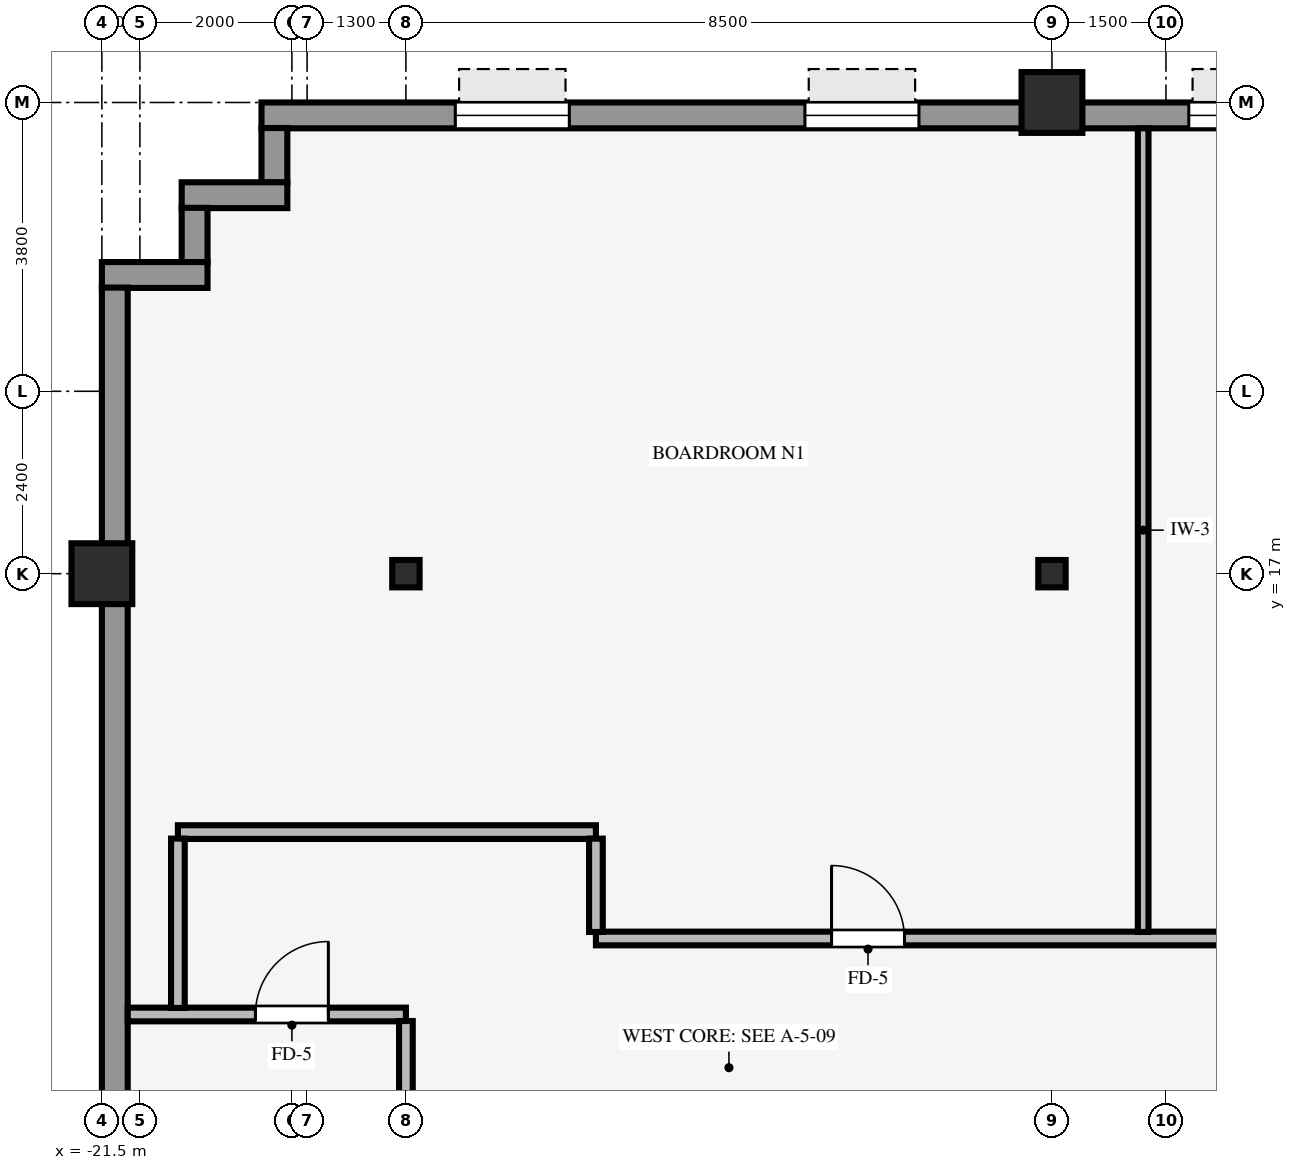
"""IFC4 building model, lengths in metres.
Left out: names, types, materials, properties, quantities, classifications, styles, units other than length and angle.
Written with IfcOpenShell. Run it as: python <this file> out.ifc"""

import sys

from ifc_helpers import new_model, si_unit, direction, frame, frame_2d, origin, origin_2d, place, context, subcontext, project, spatial, rectangle, hollow_rectangle, i_section, extrude, source, transform, mapped, element, fill, save


model = new_model("IFC4")
c1 = context("Model", 3, precision=1e-05, world=origin(), true_north=direction((0.0, 1.0)))
c2 = subcontext(c1, "Body", "Model", "MODEL_VIEW")
j1 = project(units=[si_unit("LENGTHUNIT", "METRE"), si_unit("PLANEANGLEUNIT", "RADIAN")], contexts=[c1])
p1 = place(None, origin())
s1 = spatial("IfcSite", under=j1, at=p1, CompositionType="ELEMENT")
p2 = place(p1, origin())
s2 = spatial("IfcBuilding", under=s1, at=p2, CompositionType="ELEMENT")
p3 = place(p2, frame((0.0, 0.0, 78.7)))
s3 = spatial("IfcBuildingStorey", under=s2, at=p3, CompositionType="ELEMENT", Elevation=78.7)
for number, where, z_axis, x_axis in (
    (1, (-21.5, 17.0, 0.0), (0.0, 0.0, 1.0), (1.0, 0.0, 0.0)),
    (2, (-9.0, 23.2, 0.0), (0.0, 0.0, 1.0), (1.0, 0.0, 0.0)),
):
    element("IfcColumn", number, at=place(p3, frame(where, z_axis=z_axis, x_axis=x_axis)), inside=s3, PredefinedType="COLUMN", context=c2, shape_type="SweptSolid", body=[
        extrude(hollow_rectangle(XDim=0.8, YDim=0.8, WallThickness=0.055, InnerFilletRadius=0.055, OuterFilletRadius=0.11, at=origin_2d()), origin(), (0.0, 0.0, 1.0), 3.37),
    ])
for number, where, z_axis, x_axis in (
    (3, (-17.5, 17.0, 0.0), (0.0, 0.0, 1.0), (1.0, 0.0, 0.0)),
    (4, (-9.0, 17.0, 0.0), (0.0, 0.0, 1.0), (1.0, 0.0, 0.0)),
):
    element("IfcColumn", number, at=place(p3, frame(where, z_axis=z_axis, x_axis=x_axis)), inside=s3, PredefinedType="COLUMN", context=c2, shape_type="SweptSolid", body=[
        extrude(i_section(OverallWidth=0.36, OverallDepth=0.36, WebThickness=0.021, FlangeThickness=0.021, FilletRadius=0.018, at=origin_2d()), origin(), (0.0, 0.0, 1.0), 3.37),
    ])
p4 = place(p3, frame((-19.4, 23.03, 0.0), z_axis=(0.0, 0.0, 1.0), x_axis=(1.0, 0.0, 0.0)))
e5 = element("IfcWall", 5, at=p4, inside=s3, PredefinedType="STANDARD", context=c2, shape_type="SweptSolid", body=[
    extrude(rectangle(XDim=38.8, YDim=0.34, at=frame_2d((19.4, 0.0))), origin(), (0.0, 0.0, 1.0), 2.705),
])
p5 = place(p4, frame((2.55, 0.0, 0.8)))
e6 = element("IfcOpeningElement", 6, at=p5, cuts=e5, PredefinedType="OPENING", context=c2, shape_type="SweptSolid", body=[
    extrude(rectangle(XDim=1.5, YDim=1.6, at=frame_2d((0.75, 0.8))), frame((0.0, 0.18, 0.0), z_axis=(0.0, -1.0, 0.0), x_axis=(1.0, 0.0, 0.0)), (0.0, 0.0, 1.0), 0.36),
])
p6 = place(p4, frame((7.15, 0.0, 0.8)))
e7 = element("IfcOpeningElement", 7, at=p6, cuts=e5, PredefinedType="OPENING", context=c2, shape_type="SweptSolid", body=[
    extrude(rectangle(XDim=1.5, YDim=1.6, at=frame_2d((0.75, 0.8))), frame((0.0, 0.18, 0.0), z_axis=(0.0, -1.0, 0.0), x_axis=(1.0, 0.0, 0.0)), (0.0, 0.0, 1.0), 0.36),
])
p7 = place(p4, frame((12.2, 0.0, 0.8)))
e8 = element("IfcOpeningElement", 8, at=p7, cuts=e5, PredefinedType="OPENING", context=c2, shape_type="SweptSolid", body=[
    extrude(rectangle(XDim=1.5, YDim=1.6, at=frame_2d((0.75, 0.8))), frame((0.0, 0.18, 0.0), z_axis=(0.0, -1.0, 0.0), x_axis=(1.0, 0.0, 0.0)), (0.0, 0.0, 1.0), 0.36),
])
p8 = place(p4, frame((16.35, 0.0, 0.8)))
e9 = element("IfcOpeningElement", 9, at=p8, cuts=e5, PredefinedType="OPENING", context=c2, shape_type="SweptSolid", body=[
    extrude(rectangle(XDim=1.5, YDim=1.6, at=frame_2d((0.75, 0.8))), frame((0.0, 0.18, 0.0), z_axis=(0.0, -1.0, 0.0), x_axis=(1.0, 0.0, 0.0)), (0.0, 0.0, 1.0), 0.36),
])
p9 = place(p4, frame((20.95, 0.0, 0.8)))
e10 = element("IfcOpeningElement", 10, at=p9, cuts=e5, PredefinedType="OPENING", context=c2, shape_type="SweptSolid", body=[
    extrude(rectangle(XDim=1.5, YDim=1.6, at=frame_2d((0.75, 0.8))), frame((0.0, 0.18, 0.0), z_axis=(0.0, -1.0, 0.0), x_axis=(1.0, 0.0, 0.0)), (0.0, 0.0, 1.0), 0.36),
])
p10 = place(p4, frame((25.55, 0.0, 0.8)))
e11 = element("IfcOpeningElement", 11, at=p10, cuts=e5, PredefinedType="OPENING", context=c2, shape_type="SweptSolid", body=[
    extrude(rectangle(XDim=1.5, YDim=1.6, at=frame_2d((0.75, 0.8))), frame((0.0, 0.18, 0.0), z_axis=(0.0, -1.0, 0.0), x_axis=(1.0, 0.0, 0.0)), (0.0, 0.0, 1.0), 0.36),
])
p11 = place(p4, frame((30.15, 0.0, 0.8)))
e12 = element("IfcOpeningElement", 12, at=p11, cuts=e5, PredefinedType="OPENING", context=c2, shape_type="SweptSolid", body=[
    extrude(rectangle(XDim=1.5, YDim=1.6, at=frame_2d((0.75, 0.8))), frame((0.0, 0.18, 0.0), z_axis=(0.0, -1.0, 0.0), x_axis=(1.0, 0.0, 0.0)), (0.0, 0.0, 1.0), 0.36),
])
p12 = place(p4, frame((34.75, 0.0, 0.8)))
e13 = element("IfcOpeningElement", 13, at=p12, cuts=e5, PredefinedType="OPENING", context=c2, shape_type="SweptSolid", body=[
    extrude(rectangle(XDim=1.5, YDim=1.6, at=frame_2d((0.75, 0.8))), frame((0.0, 0.18, 0.0), z_axis=(0.0, -1.0, 0.0), x_axis=(1.0, 0.0, 0.0)), (0.0, 0.0, 1.0), 0.36),
])
p13 = place(p3, frame((-19.23, 22.146, 0.0), z_axis=(0.0, 0.0, 1.0), x_axis=(0.0, 1.0, 0.0)))
e14 = element("IfcWall", 14, at=p13, inside=s3, PredefinedType="STANDARD", context=c2, shape_type="SweptSolid", body=[
    extrude(rectangle(XDim=0.718, YDim=0.34, at=frame_2d((0.359, 0.0))), origin(), (0.0, 0.0, 1.0), 3.36),
])
p14 = place(p3, frame((-20.45, 21.98, 0.0), z_axis=(0.0, 0.0, 1.0), x_axis=(1.0, 0.0, 0.0)))
e15 = element("IfcWall", 15, at=p14, inside=s3, PredefinedType="STANDARD", context=c2, shape_type="SweptSolid", body=[
    extrude(rectangle(XDim=1.39, YDim=0.34, at=frame_2d((0.695, 0.0))), origin(), (0.0, 0.0, 1.0), 3.36),
])
p15 = place(p3, frame((-20.28, 21.096, 0.0), z_axis=(0.0, 0.0, 1.0), x_axis=(0.0, 1.0, 0.0)))
e16 = element("IfcWall", 16, at=p15, inside=s3, PredefinedType="STANDARD", context=c2, shape_type="SweptSolid", body=[
    extrude(rectangle(XDim=0.718, YDim=0.34, at=frame_2d((0.359, 0.0))), origin(), (0.0, 0.0, 1.0), 3.36),
])
p16 = place(p3, frame((-21.5, 20.93, 0.0), z_axis=(0.0, 0.0, 1.0), x_axis=(1.0, 0.0, 0.0)))
e17 = element("IfcWall", 17, at=p16, inside=s3, PredefinedType="STANDARD", context=c2, shape_type="SweptSolid", body=[
    extrude(rectangle(XDim=1.39, YDim=0.34, at=frame_2d((0.695, 0.0))), origin(), (0.0, 0.0, 1.0), 3.36),
])
p17 = place(p3, frame((-21.33, -20.764, 0.0), z_axis=(0.0, 0.0, 1.0), x_axis=(0.0, 1.0, 0.0)))
e18 = element("IfcWall", 18, at=p17, inside=s3, PredefinedType="STANDARD", context=c2, shape_type="SweptSolid", body=[
    extrude(rectangle(XDim=41.528, YDim=0.34, at=frame_2d((20.764, 0.0))), origin(), (0.0, 0.0, 1.0), 2.705),
])
p18 = place(p17, frame((15.364, 0.0, 0.0)))
e19 = element("IfcOpeningElement", 19, at=p18, cuts=e18, PredefinedType="OPENING", context=c2, shape_type="SweptSolid", body=[
    extrude(rectangle(XDim=1.05, YDim=2.1, at=frame_2d((0.525, 1.05))), frame((0.0, 0.18, 0.0), z_axis=(0.0, -1.0, 0.0), x_axis=(1.0, 0.0, 0.0)), (0.0, 0.0, 1.0), 0.36),
])
p19 = place(p17, frame((12.202, 0.0, 0.8)))
e20 = element("IfcOpeningElement", 20, at=p19, cuts=e18, PredefinedType="OPENING", context=c2, shape_type="SweptSolid", body=[
    extrude(rectangle(XDim=2.3, YDim=1.62, at=frame_2d((1.15, 0.81))), frame((0.0, 0.18, 0.0), z_axis=(0.0, -1.0, 0.0), x_axis=(1.0, 0.0, 0.0)), (0.0, 0.0, 1.0), 0.36),
])
p20 = place(p17, frame((17.144, 0.0, 0.8)))
e21 = element("IfcOpeningElement", 21, at=p20, cuts=e18, PredefinedType="OPENING", context=c2, shape_type="SweptSolid", body=[
    extrude(rectangle(XDim=2.3, YDim=1.62, at=frame_2d((1.15, 0.81))), frame((0.0, 0.18, 0.0), z_axis=(0.0, -1.0, 0.0), x_axis=(1.0, 0.0, 0.0)), (0.0, 0.0, 1.0), 0.36),
])
p21 = place(p17, frame((22.084, 0.0, 0.8)))
e22 = element("IfcOpeningElement", 22, at=p21, cuts=e18, PredefinedType="OPENING", context=c2, shape_type="SweptSolid", body=[
    extrude(rectangle(XDim=2.3, YDim=1.62, at=frame_2d((1.15, 0.81))), frame((0.0, 0.18, 0.0), z_axis=(0.0, -1.0, 0.0), x_axis=(1.0, 0.0, 0.0)), (0.0, 0.0, 1.0), 0.36),
])
p22 = place(p17, frame((27.025, 0.0, 0.8)))
e23 = element("IfcOpeningElement", 23, at=p22, cuts=e18, PredefinedType="OPENING", context=c2, shape_type="SweptSolid", body=[
    extrude(rectangle(XDim=2.3, YDim=1.62, at=frame_2d((1.15, 0.81))), frame((0.0, 0.18, 0.0), z_axis=(0.0, -1.0, 0.0), x_axis=(1.0, 0.0, 0.0)), (0.0, 0.0, 1.0), 0.36),
])
p23 = place(p3, frame((-21.16, 11.2, 0.0), z_axis=(0.0, 0.0, 1.0), x_axis=(1.0, 0.0, 0.0)))
e24 = element("IfcWall", 24, at=p23, inside=s3, PredefinedType="PARTITIONING", context=c2, shape_type="SweptSolid", body=[
    extrude(rectangle(XDim=3.66, YDim=0.18, at=frame_2d((1.83, 0.0))), origin(), (0.0, 0.0, 1.0), 3.36),
])
p24 = place(p23, frame((1.68, 0.0, 0.0)))
e25 = element("IfcOpeningElement", 25, at=p24, cuts=e24, PredefinedType="OPENING", context=c2, shape_type="SweptSolid", body=[
    extrude(rectangle(XDim=0.96, YDim=2.1, at=frame_2d((0.48, 1.05))), frame((0.0, 0.1, 0.0), z_axis=(0.0, -1.0, 0.0), x_axis=(1.0, 0.0, 0.0)), (0.0, 0.0, 1.0), 0.2),
])
p25 = place(p3, frame((-15.0, 12.2, 0.0), z_axis=(0.0, 0.0, 1.0), x_axis=(1.0, 0.0, 0.0)))
e26 = element("IfcWall", 26, at=p25, inside=s3, PredefinedType="PARTITIONING", context=c2, shape_type="SweptSolid", body=[
    extrude(rectangle(XDim=30.0, YDim=0.18, at=frame_2d((15.0, 0.0))), origin(), (0.0, 0.0, 1.0), 3.36),
])
p26 = place(p25, frame((3.1, 0.0, 0.0)))
e27 = element("IfcOpeningElement", 27, at=p26, cuts=e26, PredefinedType="OPENING", context=c2, shape_type="SweptSolid", body=[
    extrude(rectangle(XDim=0.96, YDim=2.1, at=frame_2d((0.48, 1.05))), frame((0.0, 0.1, 0.0), z_axis=(0.0, -1.0, 0.0), x_axis=(1.0, 0.0, 0.0)), (0.0, 0.0, 1.0), 0.2),
])
p27 = place(p25, frame((16.395, 0.0, 0.0)))
e28 = element("IfcOpeningElement", 28, at=p27, cuts=e26, PredefinedType="OPENING", context=c2, shape_type="SweptSolid", body=[
    extrude(rectangle(XDim=0.96, YDim=2.1, at=frame_2d((0.48, 1.05))), frame((0.0, 0.1, 0.0), z_axis=(0.0, -1.0, 0.0), x_axis=(1.0, 0.0, 0.0)), (0.0, 0.0, 1.0), 0.2),
])
p28 = place(p25, frame((21.62, 0.0, 0.0)))
e29 = element("IfcOpeningElement", 29, at=p28, cuts=e26, PredefinedType="OPENING", context=c2, shape_type="SweptSolid", body=[
    extrude(rectangle(XDim=0.96, YDim=2.1, at=frame_2d((0.48, 1.05))), frame((0.0, 0.1, 0.0), z_axis=(0.0, -1.0, 0.0), x_axis=(1.0, 0.0, 0.0)), (0.0, 0.0, 1.0), 0.2),
])
p29 = place(p25, frame((9.0, 0.0, 0.0)))
e30 = element("IfcOpeningElement", 30, at=p29, cuts=e26, PredefinedType="OPENING", context=c2, shape_type="SweptSolid", body=[
    extrude(rectangle(XDim=0.96, YDim=2.1, at=frame_2d((0.48, 1.05))), frame((0.0, 0.1, 0.0), z_axis=(0.0, -1.0, 0.0), x_axis=(1.0, 0.0, 0.0)), (0.0, 0.0, 1.0), 0.2),
])
p30 = place(p25, frame((26.08, 0.0, 0.0)))
e31 = element("IfcOpeningElement", 31, at=p30, cuts=e26, PredefinedType="OPENING", context=c2, shape_type="SweptSolid", body=[
    extrude(rectangle(XDim=0.96, YDim=2.1, at=frame_2d((0.48, 1.05))), frame((0.0, 0.1, 0.0), z_axis=(0.0, -1.0, 0.0), x_axis=(1.0, 0.0, 0.0)), (0.0, 0.0, 1.0), 0.2),
])
p31 = place(p3, frame((-20.5, 13.6, 0.0), z_axis=(0.0, 0.0, 1.0), x_axis=(1.0, 0.0, 0.0)))
e32 = element("IfcWall", 32, at=p31, inside=s3, PredefinedType="PARTITIONING", context=c2, shape_type="SweptSolid", body=[
    extrude(rectangle(XDim=5.5, YDim=0.18, at=frame_2d((2.75, 0.0))), origin(), (0.0, 0.0, 1.0), 2.942),
])
p32 = place(p3, frame((-20.5, 11.286, 0.0), z_axis=(0.0, 0.0, 1.0), x_axis=(0.0, 1.0, 0.0)))
e33 = element("IfcWall", 33, at=p32, inside=s3, PredefinedType="PARTITIONING", context=c2, shape_type="SweptSolid", body=[
    extrude(rectangle(XDim=2.228, YDim=0.18, at=frame_2d((1.114, 0.0))), origin(), (0.0, 0.0, 1.0), 3.36),
])
p33 = place(p3, frame((-17.5, 10.146, 0.0), z_axis=(0.0, 0.0, 1.0), x_axis=(0.0, 1.0, 0.0)))
e34 = element("IfcWall", 34, at=p33, inside=s3, PredefinedType="PARTITIONING", context=c2, shape_type="SweptSolid", body=[
    extrude(rectangle(XDim=0.968, YDim=0.18, at=frame_2d((0.484, 0.0))), origin(), (0.0, 0.0, 1.0), 2.738),
])
p34 = place(p3, frame((-15.0, 12.286, 0.0), z_axis=(0.0, 0.0, 1.0), x_axis=(0.0, 1.0, 0.0)))
e35 = element("IfcWall", 35, at=p34, inside=s3, PredefinedType="PARTITIONING", context=c2, shape_type="SweptSolid", body=[
    extrude(rectangle(XDim=1.228, YDim=0.18, at=frame_2d((0.614, 0.0))), origin(), (0.0, 0.0, 1.0), 3.36),
])
p35 = place(p3, frame((-7.8, 12.286, 0.0), z_axis=(0.0, 0.0, 1.0), x_axis=(0.0, 1.0, 0.0)))
e36 = element("IfcWall", 36, at=p35, inside=s3, PredefinedType="PARTITIONING", context=c2, shape_type="SweptSolid", body=[
    extrude(rectangle(XDim=10.574, YDim=0.14, at=frame_2d((5.287, 0.0))), origin(), (0.0, 0.0, 1.0), 3.36),
])
m1 = source(origin(), c2, "Body", "SweptSolid", [
    extrude(rectangle(XDim=1.5, YDim=1.6, at=frame_2d((0.75, 0.8))), frame((0.0, 0.03, 0.0), z_axis=(0.0, -1.0, 0.0), x_axis=(1.0, 0.0, 0.0)), (0.0, 0.0, 1.0), 0.06),
])
p36 = place(p5, origin())
e37 = element("IfcWindow", 37, at=p36, inside=s3, PartitioningType="SINGLE_PANEL", PredefinedType="WINDOW", context=c2, shape_type="MappedRepresentation", body=[
    mapped(m1, transform((0.0, 0.0, 0.0), scale=1.0)),
])
fill(e6, e37)
p37 = place(p6, origin())
e38 = element("IfcWindow", 38, at=p37, inside=s3, PartitioningType="SINGLE_PANEL", PredefinedType="WINDOW", context=c2, shape_type="MappedRepresentation", body=[
    mapped(m1, transform((0.0, 0.0, 0.0), scale=1.0)),
])
fill(e7, e38)
p38 = place(p7, origin())
e39 = element("IfcWindow", 39, at=p38, inside=s3, PartitioningType="SINGLE_PANEL", PredefinedType="WINDOW", context=c2, shape_type="MappedRepresentation", body=[
    mapped(m1, transform((0.0, 0.0, 0.0), scale=1.0)),
])
fill(e8, e39)
m2 = source(origin(), c2, "Body", "SweptSolid", [
    extrude(rectangle(XDim=0.96, YDim=2.1, at=frame_2d((0.48, 1.05))), frame((0.0, 0.025, 0.0), z_axis=(0.0, -1.0, 0.0), x_axis=(1.0, 0.0, 0.0)), (0.0, 0.0, 1.0), 0.05),
])
p39 = place(p26, origin())
e40 = element("IfcDoor", 40, at=p39, inside=s3, OperationType="SINGLE_SWING_LEFT", PredefinedType="DOOR", context=c2, shape_type="MappedRepresentation", body=[
    mapped(m2, transform((0.0, 0.0, 0.0), scale=1.0)),
])
fill(e27, e40)
p40 = place(p24, origin())
e41 = element("IfcDoor", 41, at=p40, inside=s3, OperationType="SINGLE_SWING_RIGHT", PredefinedType="DOOR", context=c2, shape_type="MappedRepresentation", body=[
    mapped(m2, transform((0.0, 0.0, 0.0), scale=1.0)),
])
fill(e25, e41)
save(model, sys.argv[1])
